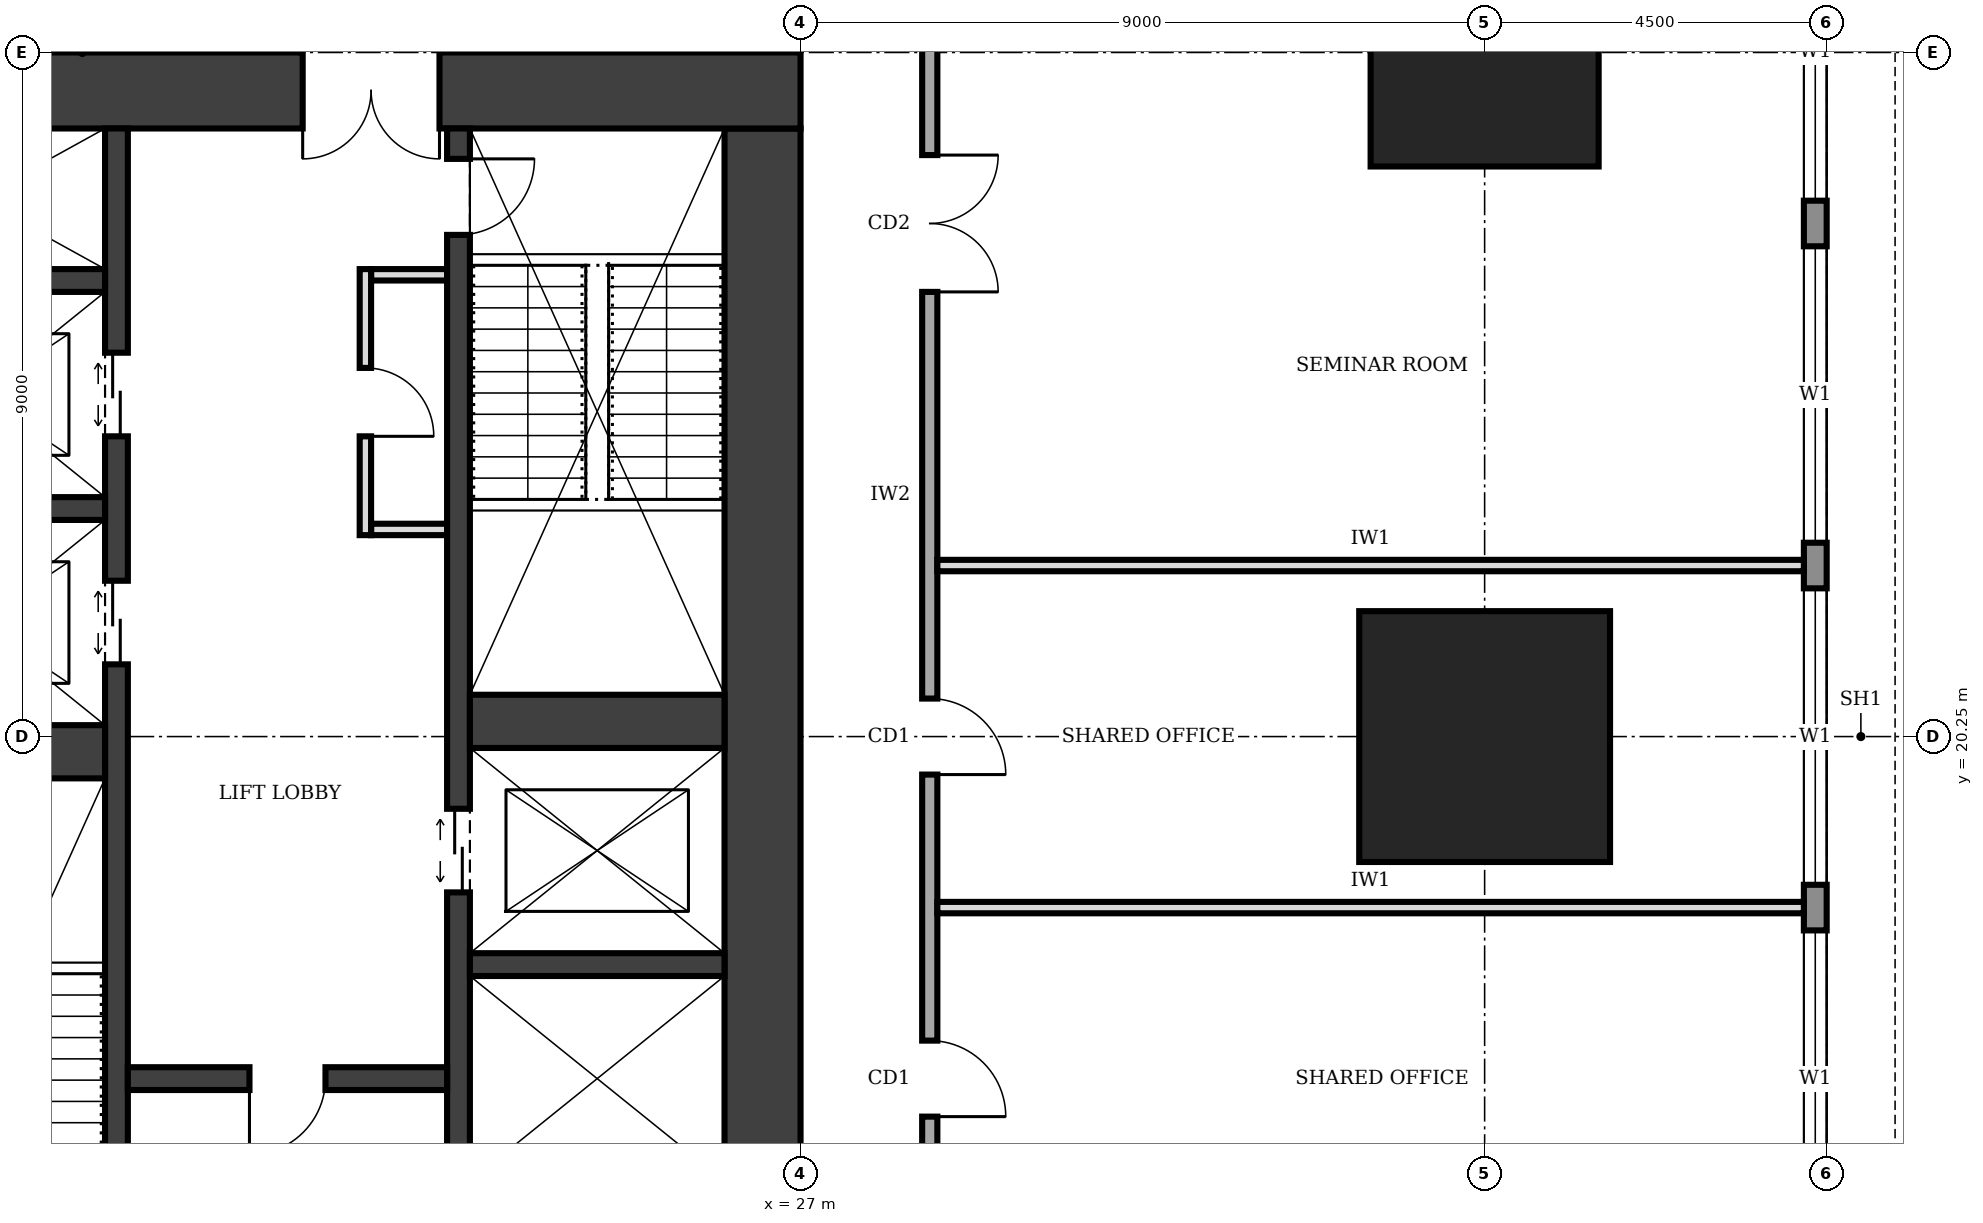
"""IFC4 building model, lengths in metres.
Left out: names, types, materials, properties, quantities, classifications, styles, units other than length and angle.
Written with IfcOpenShell. Run it as: python <this file> out.ifc"""

import sys

from ifc_helpers import new_model, si_unit, direction, frame, frame_2d, origin, origin_2d, place, context, subcontext, project, spatial, rectangle, extrude, element, fill, save


model = new_model("IFC4")
c1 = context("Model", 3, precision=1e-05, world=origin(), true_north=direction((0.0, 1.0)))
c2 = subcontext(c1, "Body", "Model", "MODEL_VIEW")
j1 = project(units=[si_unit("LENGTHUNIT", "METRE"), si_unit("PLANEANGLEUNIT", "RADIAN")], contexts=[c1])
p1 = place(None, origin())
s1 = spatial("IfcSite", under=j1, at=p1, CompositionType="ELEMENT")
p2 = place(p1, origin())
s2 = spatial("IfcBuilding", under=s1, at=p2, CompositionType="ELEMENT")
p3 = place(p2, frame((0.0, 0.0, 29.0)))
s3 = spatial("IfcBuildingStorey", under=s2, at=p3, CompositionType="ELEMENT", Elevation=29.0)
p4 = place(p3, frame((26.5, 12.25, 0.0), z_axis=(0.0, 0.0, 1.0), x_axis=(0.0, 1.0, 0.0)))
e1 = element("IfcWall", 1, at=p4, inside=s3, PredefinedType="SHEAR", context=c2, shape_type="SweptSolid", body=[
    extrude(rectangle(XDim=16.0, YDim=1.0, at=frame_2d((8.0, 0.0))), origin(), (0.0, 0.0, 1.0), 4.0),
])
p5 = place(p3, frame((27.0, 28.75, 0.0), z_axis=(0.0, 0.0, 1.0), x_axis=(-1.0, 0.0, 0.0)))
e2 = element("IfcWall", 2, at=p5, inside=s3, PredefinedType="SHEAR", context=c2, shape_type="SweptSolid", body=[
    extrude(rectangle(XDim=13.5, YDim=1.0, at=frame_2d((6.75, 0.0))), origin(), (0.0, 0.0, 1.0), 4.0),
])
p6 = place(p5, frame((4.75, 0.0, 0.0)))
e3 = element("IfcOpeningElement", 3, at=p6, cuts=e2, PredefinedType="OPENING", context=c2, shape_type="SweptSolid", body=[
    extrude(rectangle(XDim=1.8, YDim=2.1, at=frame_2d((0.9, 1.05))), frame((0.0, 0.51, 0.0), z_axis=(0.0, -1.0, 0.0), x_axis=(1.0, 0.0, 0.0)), (0.0, 0.0, 1.0), 1.02),
])
p7 = place(p3, frame((18.0, 12.25, 0.0), z_axis=(0.0, 0.0, 1.0), x_axis=(0.0, 1.0, 0.0)))
e4 = element("IfcWall", 4, at=p7, inside=s3, PredefinedType="SHEAR", context=c2, shape_type="SweptSolid", body=[
    extrude(rectangle(XDim=16.0, YDim=0.3, at=frame_2d((8.0, 0.0))), origin(), (0.0, 0.0, 1.0), 4.0),
])
p8 = place(p7, frame((0.4, 0.0, 0.0)))
e5 = element("IfcOpeningElement", 5, at=p8, cuts=e4, PredefinedType="OPENING", context=c2, shape_type="SweptSolid", body=[
    extrude(rectangle(XDim=1.0, YDim=2.1, at=frame_2d((0.5, 1.05))), frame((0.0, 0.16, 0.0), z_axis=(0.0, -1.0, 0.0), x_axis=(1.0, 0.0, 0.0)), (0.0, 0.0, 1.0), 0.32),
])
p9 = place(p7, frame((8.95, 0.0, 0.0)))
e6 = element("IfcOpeningElement", 6, at=p9, cuts=e4, PredefinedType="OPENING", context=c2, shape_type="SweptSolid", body=[
    extrude(rectangle(XDim=1.1, YDim=2.1, at=frame_2d((0.55, 1.05))), frame((0.0, 0.16, 0.0), z_axis=(0.0, -1.0, 0.0), x_axis=(1.0, 0.0, 0.0)), (0.0, 0.0, 1.0), 0.32),
])
p10 = place(p7, frame((11.95, 0.0, 0.0)))
e7 = element("IfcOpeningElement", 7, at=p10, cuts=e4, PredefinedType="OPENING", context=c2, shape_type="SweptSolid", body=[
    extrude(rectangle(XDim=1.1, YDim=2.1, at=frame_2d((0.55, 1.05))), frame((0.0, 0.16, 0.0), z_axis=(0.0, -1.0, 0.0), x_axis=(1.0, 0.0, 0.0)), (0.0, 0.0, 1.0), 0.32),
])
p11 = place(p3, frame((22.5, 12.25, 0.0), z_axis=(0.0, 0.0, 1.0), x_axis=(0.0, 1.0, 0.0)))
e8 = element("IfcWall", 8, at=p11, inside=s3, PredefinedType="SHEAR", context=c2, shape_type="SweptSolid", body=[
    extrude(rectangle(XDim=16.0, YDim=0.3, at=frame_2d((8.0, 0.0))), origin(), (0.0, 0.0, 1.0), 4.0),
])
p12 = place(p11, frame((14.6, 0.0, 0.0)))
e9 = element("IfcOpeningElement", 9, at=p12, cuts=e8, PredefinedType="OPENING", context=c2, shape_type="SweptSolid", body=[
    extrude(rectangle(XDim=1.0, YDim=2.1, at=frame_2d((0.5, 1.05))), frame((0.0, 0.16, 0.0), z_axis=(0.0, -1.0, 0.0), x_axis=(1.0, 0.0, 0.0)), (0.0, 0.0, 1.0), 0.32),
])
p13 = place(p11, frame((0.375, 0.0, 0.0)))
e10 = element("IfcOpeningElement", 10, at=p13, cuts=e8, PredefinedType="OPENING", context=c2, shape_type="SweptSolid", body=[
    extrude(rectangle(XDim=1.1, YDim=2.1, at=frame_2d((0.55, 1.05))), frame((0.0, 0.16, 0.0), z_axis=(0.0, -1.0, 0.0), x_axis=(1.0, 0.0, 0.0)), (0.0, 0.0, 1.0), 0.32),
])
p14 = place(p11, frame((5.95, 0.0, 0.0)))
e11 = element("IfcOpeningElement", 11, at=p14, cuts=e8, PredefinedType="OPENING", context=c2, shape_type="SweptSolid", body=[
    extrude(rectangle(XDim=1.1, YDim=2.1, at=frame_2d((0.55, 1.05))), frame((0.0, 0.16, 0.0), z_axis=(0.0, -1.0, 0.0), x_axis=(1.0, 0.0, 0.0)), (0.0, 0.0, 1.0), 0.32),
])
p15 = place(p3, frame((14.5, 20.05, 0.0), z_axis=(0.0, 0.0, 1.0), x_axis=(1.0, 0.0, 0.0)))
e12 = element("IfcWall", 12, at=p15, inside=s3, PredefinedType="SHEAR", context=c2, shape_type="SweptSolid", body=[
    extrude(rectangle(XDim=3.35, YDim=0.7, at=frame_2d((1.675, 0.0))), origin(), (0.0, 0.0, 1.0), 4.0),
])
p16 = place(p3, frame((18.15, 15.75, 0.0), z_axis=(0.0, 0.0, 1.0), x_axis=(1.0, 0.0, 0.0)))
e13 = element("IfcWall", 13, at=p16, inside=s3, PredefinedType="SHEAR", context=c2, shape_type="SweptSolid", body=[
    extrude(rectangle(XDim=4.2, YDim=0.3, at=frame_2d((2.1, 0.0))), origin(), (0.0, 0.0, 1.0), 4.0),
])
p17 = place(p16, frame((1.6, 0.0, 0.0)))
e14 = element("IfcOpeningElement", 14, at=p17, cuts=e13, PredefinedType="OPENING", context=c2, shape_type="SweptSolid", body=[
    extrude(rectangle(XDim=1.0, YDim=2.1, at=frame_2d((0.5, 1.05))), frame((0.0, 0.16, 0.0), z_axis=(0.0, -1.0, 0.0), x_axis=(1.0, 0.0, 0.0)), (0.0, 0.0, 1.0), 0.32),
])
p18 = place(p3, frame((22.65, 17.25, 0.0), z_axis=(0.0, 0.0, 1.0), x_axis=(1.0, 0.0, 0.0)))
e15 = element("IfcWall", 15, at=p18, inside=s3, PredefinedType="SHEAR", context=c2, shape_type="SweptSolid", body=[
    extrude(rectangle(XDim=3.35, YDim=0.3, at=frame_2d((1.675, 0.0))), origin(), (0.0, 0.0, 1.0), 4.0),
])
p19 = place(p3, frame((22.65, 20.45, 0.0), z_axis=(0.0, 0.0, 1.0), x_axis=(1.0, 0.0, 0.0)))
e16 = element("IfcWall", 16, at=p19, inside=s3, PredefinedType="SHEAR", context=c2, shape_type="SweptSolid", body=[
    extrude(rectangle(XDim=3.35, YDim=0.7, at=frame_2d((1.675, 0.0))), origin(), (0.0, 0.0, 1.0), 4.0),
])
for number, where, z_axis, x_axis in (
    (17, (14.5, 23.25, 0.0), (0.0, 0.0, 1.0), (1.0, 0.0, 0.0)),
    (18, (14.5, 26.25, 0.0), (0.0, 0.0, 1.0), (1.0, 0.0, 0.0)),
):
    element("IfcWall", number, at=place(p3, frame(where, z_axis=z_axis, x_axis=x_axis)), inside=s3, PredefinedType="SHEAR", context=c2, shape_type="SweptSolid", body=[
        extrude(rectangle(XDim=3.35, YDim=0.3, at=frame_2d((1.675, 0.0))), origin(), (0.0, 0.0, 1.0), 4.0),
    ])
p20 = place(p3, frame((36.0, 20.25, 0.0), z_axis=(0.0, 0.0, 1.0), x_axis=(1.0, 0.0, 0.0)))
e19 = element("IfcColumn", 19, at=p20, inside=s3, PredefinedType="COLUMN", context=c2, shape_type="SweptSolid", body=[
    extrude(rectangle(XDim=3.3, YDim=3.3, at=origin_2d()), origin(), (0.0, 0.0, 1.0), 4.0),
])
p21 = place(p3, frame((36.0, 29.25, 0.0), z_axis=(0.0, 0.0, 1.0), x_axis=(1.0, 0.0, 0.0)))
e20 = element("IfcColumn", 20, at=p21, inside=s3, PredefinedType="COLUMN", context=c2, shape_type="SweptSolid", body=[
    extrude(rectangle(XDim=3.0, YDim=3.0, at=origin_2d()), origin(), (0.0, 0.0, 1.0), 4.0),
])
p22 = place(p3, frame((40.35, 4.52, 0.0), z_axis=(0.0, 0.0, 1.0), x_axis=(0.0, 1.0, 0.0)))
e21 = element("IfcWall", 21, at=p22, inside=s3, PredefinedType="STANDARD", context=c2, shape_type="SweptSolid", body=[
    extrude(rectangle(XDim=31.46, YDim=0.3, at=frame_2d((15.73, 0.0))), origin(), (0.0, 0.0, 1.0), 3.75),
])
p23 = place(p22, frame((4.78, 0.0, 0.9)))
e22 = element("IfcOpeningElement", 22, at=p23, cuts=e21, PredefinedType="OPENING", context=c2, shape_type="SweptSolid", body=[
    extrude(rectangle(XDim=3.9, YDim=2.2, at=frame_2d((1.95, 1.1))), frame((0.0, 0.16, 0.0), z_axis=(0.0, -1.0, 0.0), x_axis=(1.0, 0.0, 0.0)), (0.0, 0.0, 1.0), 0.32),
])
p24 = place(p22, frame((9.28, 0.0, 0.9)))
e23 = element("IfcOpeningElement", 23, at=p24, cuts=e21, PredefinedType="OPENING", context=c2, shape_type="SweptSolid", body=[
    extrude(rectangle(XDim=3.9, YDim=2.2, at=frame_2d((1.95, 1.1))), frame((0.0, 0.16, 0.0), z_axis=(0.0, -1.0, 0.0), x_axis=(1.0, 0.0, 0.0)), (0.0, 0.0, 1.0), 0.32),
])
p25 = place(p22, frame((13.78, 0.0, 0.9)))
e24 = element("IfcOpeningElement", 24, at=p25, cuts=e21, PredefinedType="OPENING", context=c2, shape_type="SweptSolid", body=[
    extrude(rectangle(XDim=3.9, YDim=2.2, at=frame_2d((1.95, 1.1))), frame((0.0, 0.16, 0.0), z_axis=(0.0, -1.0, 0.0), x_axis=(1.0, 0.0, 0.0)), (0.0, 0.0, 1.0), 0.32),
])
p26 = place(p22, frame((18.28, 0.0, 0.9)))
e25 = element("IfcOpeningElement", 25, at=p26, cuts=e21, PredefinedType="OPENING", context=c2, shape_type="SweptSolid", body=[
    extrude(rectangle(XDim=3.9, YDim=2.2, at=frame_2d((1.95, 1.1))), frame((0.0, 0.16, 0.0), z_axis=(0.0, -1.0, 0.0), x_axis=(1.0, 0.0, 0.0)), (0.0, 0.0, 1.0), 0.32),
])
p27 = place(p22, frame((22.78, 0.0, 0.9)))
e26 = element("IfcOpeningElement", 26, at=p27, cuts=e21, PredefinedType="OPENING", context=c2, shape_type="SweptSolid", body=[
    extrude(rectangle(XDim=3.9, YDim=2.2, at=frame_2d((1.95, 1.1))), frame((0.0, 0.16, 0.0), z_axis=(0.0, -1.0, 0.0), x_axis=(1.0, 0.0, 0.0)), (0.0, 0.0, 1.0), 0.32),
])
p28 = place(p22, frame((27.28, 0.0, 0.9)))
e27 = element("IfcOpeningElement", 27, at=p28, cuts=e21, PredefinedType="OPENING", context=c2, shape_type="SweptSolid", body=[
    extrude(rectangle(XDim=3.9, YDim=2.2, at=frame_2d((1.95, 1.1))), frame((0.0, 0.16, 0.0), z_axis=(0.0, -1.0, 0.0), x_axis=(1.0, 0.0, 0.0)), (0.0, 0.0, 1.0), 0.32),
])
p29 = place(p3, frame((21.275, 22.9, 0.0), z_axis=(0.0, 0.0, 1.0), x_axis=(0.0, 1.0, 0.0)))
e28 = element("IfcWall", 28, at=p29, inside=s3, PredefinedType="PARTITIONING", context=c2, shape_type="SweptSolid", body=[
    extrude(rectangle(XDim=3.5, YDim=0.15, at=frame_2d((1.75, 0.0))), origin(), (0.0, 0.0, 1.0), 3.75),
])
p30 = place(p29, frame((1.3, 0.0, 0.0)))
e29 = element("IfcOpeningElement", 29, at=p30, cuts=e28, PredefinedType="OPENING", context=c2, shape_type="SweptSolid", body=[
    extrude(rectangle(XDim=0.9, YDim=2.1, at=frame_2d((0.45, 1.05))), frame((0.0, 0.085, 0.0), z_axis=(0.0, -1.0, 0.0), x_axis=(1.0, 0.0, 0.0)), (0.0, 0.0, 1.0), 0.17),
])
for number, where, z_axis, x_axis in (
    (30, (21.35, 22.975, 0.0), (0.0, 0.0, 1.0), (1.0, 0.0, 0.0)),
    (31, (21.35, 26.325, 0.0), (0.0, 0.0, 1.0), (1.0, 0.0, 0.0)),
):
    element("IfcWall", number, at=place(p3, frame(where, z_axis=z_axis, x_axis=x_axis)), inside=s3, PredefinedType="PARTITIONING", context=c2, shape_type="SweptSolid", body=[
        extrude(rectangle(XDim=1.0, YDim=0.15, at=frame_2d((0.5, 0.0))), origin(), (0.0, 0.0, 1.0), 3.75),
    ])
p31 = place(p3, frame((28.7, 7.7, 0.0), z_axis=(0.0, 0.0, 1.0), x_axis=(0.0, 1.0, 0.0)))
e32 = element("IfcWall", 32, at=p31, inside=s3, PredefinedType="SOLIDWALL", context=c2, shape_type="SweptSolid", body=[
    extrude(rectangle(XDim=23.8, YDim=0.2, at=frame_2d((11.9, 0.0))), origin(), (0.0, 0.0, 1.0), 3.75),
])
p32 = place(p31, frame((2.3, 0.0, 0.0)))
e33 = element("IfcOpeningElement", 33, at=p32, cuts=e32, PredefinedType="OPENING", context=c2, shape_type="SweptSolid", body=[
    extrude(rectangle(XDim=1.0, YDim=2.1, at=frame_2d((0.5, 1.05))), frame((0.0, 0.11, 0.0), z_axis=(0.0, -1.0, 0.0), x_axis=(1.0, 0.0, 0.0)), (0.0, 0.0, 1.0), 0.22),
])
p33 = place(p31, frame((7.55, 0.0, 0.0)))
e34 = element("IfcOpeningElement", 34, at=p33, cuts=e32, PredefinedType="OPENING", context=c2, shape_type="SweptSolid", body=[
    extrude(rectangle(XDim=1.0, YDim=2.1, at=frame_2d((0.5, 1.05))), frame((0.0, 0.11, 0.0), z_axis=(0.0, -1.0, 0.0), x_axis=(1.0, 0.0, 0.0)), (0.0, 0.0, 1.0), 0.22),
])
p34 = place(p31, frame((12.05, 0.0, 0.0)))
e35 = element("IfcOpeningElement", 35, at=p34, cuts=e32, PredefinedType="OPENING", context=c2, shape_type="SweptSolid", body=[
    extrude(rectangle(XDim=1.0, YDim=2.1, at=frame_2d((0.5, 1.05))), frame((0.0, 0.11, 0.0), z_axis=(0.0, -1.0, 0.0), x_axis=(1.0, 0.0, 0.0)), (0.0, 0.0, 1.0), 0.22),
])
p35 = place(p31, frame((18.4, 0.0, 0.0)))
e36 = element("IfcOpeningElement", 36, at=p35, cuts=e32, PredefinedType="OPENING", context=c2, shape_type="SweptSolid", body=[
    extrude(rectangle(XDim=1.8, YDim=2.1, at=frame_2d((0.9, 1.05))), frame((0.0, 0.11, 0.0), z_axis=(0.0, -1.0, 0.0), x_axis=(1.0, 0.0, 0.0)), (0.0, 0.0, 1.0), 0.22),
])
for number, where, z_axis, x_axis in (
    (37, (28.8, 18.0, 0.0), (0.0, 0.0, 1.0), (1.0, 0.0, 0.0)),
    (38, (28.8, 22.5, 0.0), (0.0, 0.0, 1.0), (1.0, 0.0, 0.0)),
):
    element("IfcWall", number, at=place(p3, frame(where, z_axis=z_axis, x_axis=x_axis)), inside=s3, PredefinedType="PARTITIONING", context=c2, shape_type="SweptSolid", body=[
        extrude(rectangle(XDim=11.4, YDim=0.15, at=frame_2d((5.7, 0.0))), origin(), (0.0, 0.0, 1.0), 3.75),
    ])
p36 = place(p24, origin())
e39 = element("IfcWindow", 39, at=p36, inside=s3, PartitioningType="SINGLE_PANEL", PredefinedType="WINDOW", context=c2, shape_type="SweptSolid", body=[
    extrude(rectangle(XDim=3.9, YDim=2.2, at=frame_2d((1.95, 1.1))), frame((0.0, 0.03, 0.0), z_axis=(0.0, -1.0, 0.0), x_axis=(1.0, 0.0, 0.0)), (0.0, 0.0, 1.0), 0.06),
])
fill(e23, e39)
p37 = place(p25, origin())
e40 = element("IfcWindow", 40, at=p37, inside=s3, PartitioningType="SINGLE_PANEL", PredefinedType="WINDOW", context=c2, shape_type="SweptSolid", body=[
    extrude(rectangle(XDim=3.9, YDim=2.2, at=frame_2d((1.95, 1.1))), frame((0.0, 0.03, 0.0), z_axis=(0.0, -1.0, 0.0), x_axis=(1.0, 0.0, 0.0)), (0.0, 0.0, 1.0), 0.06),
])
fill(e24, e40)
p38 = place(p26, origin())
e41 = element("IfcWindow", 41, at=p38, inside=s3, PartitioningType="SINGLE_PANEL", PredefinedType="WINDOW", context=c2, shape_type="SweptSolid", body=[
    extrude(rectangle(XDim=3.9, YDim=2.2, at=frame_2d((1.95, 1.1))), frame((0.0, 0.03, 0.0), z_axis=(0.0, -1.0, 0.0), x_axis=(1.0, 0.0, 0.0)), (0.0, 0.0, 1.0), 0.06),
])
fill(e25, e41)
p39 = place(p27, origin())
e42 = element("IfcWindow", 42, at=p39, inside=s3, PartitioningType="SINGLE_PANEL", PredefinedType="WINDOW", context=c2, shape_type="SweptSolid", body=[
    extrude(rectangle(XDim=3.9, YDim=2.2, at=frame_2d((1.95, 1.1))), frame((0.0, 0.03, 0.0), z_axis=(0.0, -1.0, 0.0), x_axis=(1.0, 0.0, 0.0)), (0.0, 0.0, 1.0), 0.06),
])
fill(e26, e42)
p40 = place(p6, origin())
e43 = element("IfcDoor", 43, at=p40, inside=s3, OperationType="DOUBLE_DOOR_SINGLE_SWING", PredefinedType="DOOR", context=c2, shape_type="SweptSolid", body=[
    extrude(rectangle(XDim=1.8, YDim=2.1, at=frame_2d((0.9, 1.05))), frame((0.0, 0.025, 0.0), z_axis=(0.0, -1.0, 0.0), x_axis=(1.0, 0.0, 0.0)), (0.0, 0.0, 1.0), 0.05),
])
fill(e3, e43)
p41 = place(p17, frame((1.0, 0.0, 0.0), z_axis=(0.0, 0.0, 1.0), x_axis=(-1.0, 0.0, 0.0)))
e44 = element("IfcDoor", 44, at=p41, inside=s3, OperationType="SINGLE_SWING_RIGHT", PredefinedType="DOOR", context=c2, shape_type="SweptSolid", body=[
    extrude(rectangle(XDim=1.0, YDim=2.1, at=frame_2d((0.5, 1.05))), frame((0.0, 0.025, 0.0), z_axis=(0.0, -1.0, 0.0), x_axis=(1.0, 0.0, 0.0)), (0.0, 0.0, 1.0), 0.05),
])
fill(e14, e44)
p42 = place(p12, frame((1.0, 0.0, 0.0), z_axis=(0.0, 0.0, 1.0), x_axis=(-1.0, 0.0, 0.0)))
e45 = element("IfcDoor", 45, at=p42, inside=s3, OperationType="SINGLE_SWING_LEFT", PredefinedType="DOOR", context=c2, shape_type="SweptSolid", body=[
    extrude(rectangle(XDim=1.0, YDim=2.1, at=frame_2d((0.5, 1.05))), frame((0.0, 0.025, 0.0), z_axis=(0.0, -1.0, 0.0), x_axis=(1.0, 0.0, 0.0)), (0.0, 0.0, 1.0), 0.05),
])
fill(e9, e45)
p43 = place(p9, origin())
e46 = element("IfcDoor", 46, at=p43, inside=s3, OperationType="DOUBLE_DOOR_SLIDING", PredefinedType="DOOR", context=c2, shape_type="SweptSolid", body=[
    extrude(rectangle(XDim=1.1, YDim=2.1, at=frame_2d((0.55, 1.05))), frame((0.0, 0.025, 0.0), z_axis=(0.0, -1.0, 0.0), x_axis=(1.0, 0.0, 0.0)), (0.0, 0.0, 1.0), 0.05),
])
fill(e6, e46)
p44 = place(p10, origin())
e47 = element("IfcDoor", 47, at=p44, inside=s3, OperationType="DOUBLE_DOOR_SLIDING", PredefinedType="DOOR", context=c2, shape_type="SweptSolid", body=[
    extrude(rectangle(XDim=1.1, YDim=2.1, at=frame_2d((0.55, 1.05))), frame((0.0, 0.025, 0.0), z_axis=(0.0, -1.0, 0.0), x_axis=(1.0, 0.0, 0.0)), (0.0, 0.0, 1.0), 0.05),
])
fill(e7, e47)
p45 = place(p14, origin())
e48 = element("IfcDoor", 48, at=p45, inside=s3, OperationType="DOUBLE_DOOR_SLIDING", PredefinedType="DOOR", context=c2, shape_type="SweptSolid", body=[
    extrude(rectangle(XDim=1.1, YDim=2.1, at=frame_2d((0.55, 1.05))), frame((0.0, 0.025, 0.0), z_axis=(0.0, -1.0, 0.0), x_axis=(1.0, 0.0, 0.0)), (0.0, 0.0, 1.0), 0.05),
])
fill(e11, e48)
p46 = place(p30, frame((0.9, 0.0, 0.0), z_axis=(0.0, 0.0, 1.0), x_axis=(-1.0, 0.0, 0.0)))
e49 = element("IfcDoor", 49, at=p46, inside=s3, OperationType="SINGLE_SWING_RIGHT", PredefinedType="DOOR", context=c2, shape_type="SweptSolid", body=[
    extrude(rectangle(XDim=0.9, YDim=2.1, at=frame_2d((0.45, 1.05))), frame((0.0, 0.025, 0.0), z_axis=(0.0, -1.0, 0.0), x_axis=(1.0, 0.0, 0.0)), (0.0, 0.0, 1.0), 0.05),
])
fill(e29, e49)
p47 = place(p33, frame((1.0, 0.0, 0.0), z_axis=(0.0, 0.0, 1.0), x_axis=(-1.0, 0.0, 0.0)))
e50 = element("IfcDoor", 50, at=p47, inside=s3, OperationType="SINGLE_SWING_RIGHT", PredefinedType="DOOR", context=c2, shape_type="SweptSolid", body=[
    extrude(rectangle(XDim=1.0, YDim=2.1, at=frame_2d((0.5, 1.05))), frame((0.0, 0.025, 0.0), z_axis=(0.0, -1.0, 0.0), x_axis=(1.0, 0.0, 0.0)), (0.0, 0.0, 1.0), 0.05),
])
fill(e34, e50)
p48 = place(p34, frame((1.0, 0.0, 0.0), z_axis=(0.0, 0.0, 1.0), x_axis=(-1.0, 0.0, 0.0)))
e51 = element("IfcDoor", 51, at=p48, inside=s3, OperationType="SINGLE_SWING_RIGHT", PredefinedType="DOOR", context=c2, shape_type="SweptSolid", body=[
    extrude(rectangle(XDim=1.0, YDim=2.1, at=frame_2d((0.5, 1.05))), frame((0.0, 0.025, 0.0), z_axis=(0.0, -1.0, 0.0), x_axis=(1.0, 0.0, 0.0)), (0.0, 0.0, 1.0), 0.05),
])
fill(e35, e51)
p49 = place(p35, frame((1.8, 0.0, 0.0), z_axis=(0.0, 0.0, 1.0), x_axis=(-1.0, 0.0, 0.0)))
e52 = element("IfcDoor", 52, at=p49, inside=s3, OperationType="DOUBLE_DOOR_SINGLE_SWING", PredefinedType="DOOR", context=c2, shape_type="SweptSolid", body=[
    extrude(rectangle(XDim=1.8, YDim=2.1, at=frame_2d((0.9, 1.05))), frame((0.0, 0.025, 0.0), z_axis=(0.0, -1.0, 0.0), x_axis=(1.0, 0.0, 0.0)), (0.0, 0.0, 1.0), 0.05),
])
fill(e36, e52)
save(model, sys.argv[1])
